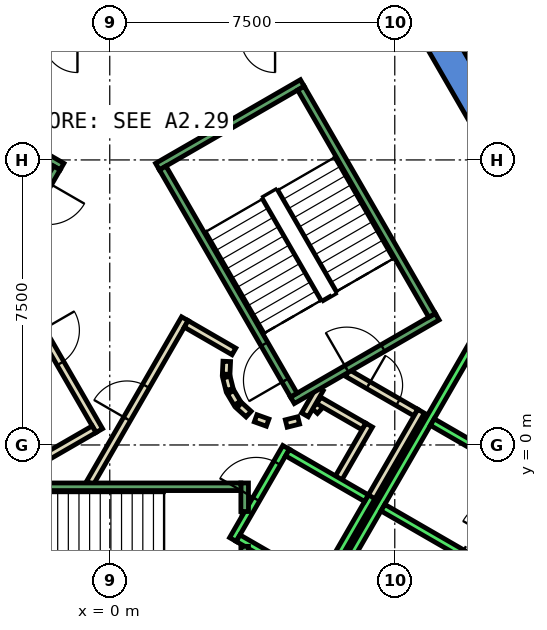
"""IFC4 building model, lengths in metres.
Left out: names, types, materials, properties, quantities, classifications, styles, units other than length and angle.
Written with IfcOpenShell. Run it as: python <this file> out.ifc"""

import sys

from ifc_helpers import new_model, si_unit, direction, frame, frame_2d, origin, place, context, subcontext, project, spatial, polyline, rectangle, outline, extrude, element, fill, save


model = new_model("IFC4")
c1 = context("Model", 3, precision=1e-05, world=origin(), true_north=direction((0.0, 1.0)))
c2 = subcontext(c1, "Body", "Model", "MODEL_VIEW")
j1 = project(units=[si_unit("LENGTHUNIT", "METRE"), si_unit("PLANEANGLEUNIT", "RADIAN")], contexts=[c1])
p1 = place(None, origin())
s1 = spatial("IfcSite", under=j1, at=p1, CompositionType="ELEMENT")
p2 = place(p1, origin())
s2 = spatial("IfcBuilding", under=s1, at=p2, CompositionType="ELEMENT")
p3 = place(p2, frame((0.0, 0.0, 142.4)))
s3 = spatial("IfcBuildingStorey", under=s2, at=p3, CompositionType="ELEMENT", Elevation=142.4)
p4 = place(p3, frame((0.0, 0.0, -0.4)))
e1 = element("IfcWall", 1, at=p4, inside=s3, PredefinedType="SHEAR", context=c2, shape_type="SweptSolid", body=[
    extrude(outline(polyline([(8.517, 11.748), (7.824, 11.348), (12.933, 2.5), (13.856, 2.5), (8.517, 11.748)])), origin(), (0.0, 0.0, 1.0), 4.2),
])
p5 = place(p3, frame((0.0, 0.0, -0.4)))
e2 = element("IfcWall", 2, at=p5, inside=s3, PredefinedType="SHEAR", context=c2, shape_type="SweptSolid", body=[
    extrude(outline(polyline([(10.717, -2.937), (10.025, -2.537), (9.374, -3.663), (10.067, -4.063), (10.717, -2.937)])), origin(), (0.0, 0.0, 1.0), 4.2),
])
p6 = place(p3, frame((5.39, 0.898, 0.0), z_axis=(0.0, 0.0, 1.0), x_axis=(0.673828488714, 0.738887791073, 0.0)))
e3 = element("IfcWall", 3, at=p6, inside=s3, PredefinedType="PARTITIONING", context=c2, shape_type="SweptSolid", body=[
    extrude(rectangle(XDim=0.263, YDim=0.2, at=frame_2d((0.131, 0.0))), origin(), (0.0, 0.0, 1.0), 3.8),
])
p7 = place(p3, frame((5.499, 1.172, 0.0), z_axis=(0.0, 0.0, 1.0), x_axis=(0.866333505267, -0.499465972466, 0.0)))
e4 = element("IfcWall", 4, at=p7, inside=s3, PredefinedType="PARTITIONING", context=c2, shape_type="SweptSolid", body=[
    extrude(rectangle(XDim=1.374, YDim=0.2, at=frame_2d((0.687, 0.0))), origin(), (0.0, 0.0, 1.0), 3.8),
])
p8 = place(p3, frame((6.826, 0.522, 0.0), z_axis=(0.0, 0.0, 1.0), x_axis=(-0.500016722714, -0.866015748706, 0.0)))
e5 = element("IfcWall", 5, at=p8, inside=s3, PredefinedType="PARTITIONING", context=c2, shape_type="SweptSolid", body=[
    extrude(rectangle(XDim=1.7, YDim=0.2, at=frame_2d((0.85, 0.0))), origin(), (0.0, 0.0, 1.0), 3.8),
])
p9 = place(p3, frame((6.25, 1.894, 0.0), z_axis=(0.0, 0.0, 1.0), x_axis=(0.866043184279, -0.499969202016, 0.0)))
e6 = element("IfcWall", 6, at=p9, inside=s3, PredefinedType="PARTITIONING", context=c2, shape_type="SweptSolid", body=[
    extrude(rectangle(XDim=2.084, YDim=0.2, at=frame_2d((1.042, 0.0))), origin(), (0.0, 0.0, 1.0), 3.8),
])
p10 = place(p9, frame((0.642, 0.0, 0.0)))
e7 = element("IfcOpeningElement", 7, at=p10, cuts=e6, PredefinedType="OPENING", context=c2, shape_type="SweptSolid", body=[
    extrude(rectangle(XDim=0.9, YDim=2.1, at=frame_2d((0.45, 1.05))), frame((0.0, 0.11, 0.0), z_axis=(0.0, -1.0, 0.0), x_axis=(1.0, 0.0, 0.0)), (0.0, 0.0, 1.0), 0.22),
])
p11 = place(p3, frame((8.192, 0.888, 0.0), z_axis=(0.0, 0.0, 1.0), x_axis=(-0.499940625693, -0.866059680843, 0.0)))
e8 = element("IfcWall", 8, at=p11, inside=s3, PredefinedType="PARTITIONING", context=c2, shape_type="SweptSolid", body=[
    extrude(rectangle(XDim=2.68, YDim=0.2, at=frame_2d((1.34, 0.0))), origin(), (0.0, 0.0, 1.0), 3.8),
])
p12 = place(p3, frame((5.135, 0.793, 0.0), z_axis=(0.0, 0.0, 1.0), x_axis=(0.499526442893, 0.866298639529, 0.0)))
e9 = element("IfcWall", 9, at=p12, inside=s3, PredefinedType="PARTITIONING", context=c2, shape_type="SweptSolid", body=[
    extrude(rectangle(XDim=0.791, YDim=0.2, at=frame_2d((0.396, 0.0))), origin(), (0.0, 0.0, 1.0), 3.8),
])
p13 = place(p3, frame((-0.52, -1.0, 0.0), z_axis=(0.0, 0.0, 1.0), x_axis=(0.50011622646, 0.865958290007, 0.0)))
e10 = element("IfcWall", 10, at=p13, inside=s3, PredefinedType="PARTITIONING", context=c2, shape_type="SweptSolid", body=[
    extrude(rectangle(XDim=4.991, YDim=0.2, at=frame_2d((2.496, 0.0))), origin(), (0.0, 0.0, 1.0), 3.8),
])
p14 = place(p13, frame((1.945, 0.0, 0.0)))
e11 = element("IfcOpeningElement", 11, at=p14, cuts=e10, PredefinedType="OPENING", context=c2, shape_type="SweptSolid", body=[
    extrude(rectangle(XDim=1.0, YDim=2.1, at=frame_2d((0.5, 1.05))), frame((0.0, 0.11, 0.0), z_axis=(0.0, -1.0, 0.0), x_axis=(1.0, 0.0, 0.0)), (0.0, 0.0, 1.0), 0.22),
])
p15 = place(p3, frame((2.012, 3.186, 0.0), z_axis=(0.0, 0.0, 1.0), x_axis=(0.865891012941, -0.500232699559, 0.0)))
e12 = element("IfcWall", 12, at=p15, inside=s3, PredefinedType="PARTITIONING", context=c2, shape_type="SweptSolid", body=[
    extrude(rectangle(XDim=1.449, YDim=0.2, at=frame_2d((0.725, 0.0))), origin(), (0.0, 0.0, 1.0), 3.8),
])
p16 = place(p3, frame((3.079, 2.199, 0.0), z_axis=(0.0, 0.0, 1.0), x_axis=(-0.047771483479, -0.998858290933, 0.0)))
e13 = element("IfcWall", 13, at=p16, inside=s3, PredefinedType="PARTITIONING", context=c2, shape_type="SweptSolid", body=[
    extrude(rectangle(XDim=0.337, YDim=0.2, at=frame_2d((0.169, 0.0))), origin(), (0.0, 0.0, 1.0), 3.8),
])
p17 = place(p3, frame((3.07, 1.786, 0.0), z_axis=(0.0, 0.0, 1.0), x_axis=(0.242705583207, -0.970099994784, 0.0)))
e14 = element("IfcWall", 14, at=p17, inside=s3, PredefinedType="PARTITIONING", context=c2, shape_type="SweptSolid", body=[
    extrude(rectangle(XDim=0.338, YDim=0.2, at=frame_2d((0.169, 0.0))), origin(), (0.0, 0.0, 1.0), 3.8),
])
for number, where, z_axis, x_axis in (
    (15, (3.182, 1.388, 0.0), (0.0, 0.0, 1.0), (0.512, -0.859, 0.0)),
    (16, (3.404, 1.039, 0.0), (0.0, 0.0, 1.0), (0.74, -0.672, 0.0)),
):
    element("IfcWall", number, at=place(p3, frame(where, z_axis=z_axis, x_axis=x_axis)), inside=s3, PredefinedType="PARTITIONING", context=c2, shape_type="SweptSolid", body=[
        extrude(rectangle(XDim=0.338, YDim=0.2, at=frame_2d((0.169, 0.0))), origin(), (0.0, 0.0, 1.0), 3.8),
    ])
p18 = place(p3, frame((3.838, 0.702, 0.0), z_axis=(0.0, 0.0, 1.0), x_axis=(0.941035081519, -0.338308993895, 0.0)))
e17 = element("IfcWall", 17, at=p18, inside=s3, PredefinedType="PARTITIONING", context=c2, shape_type="SweptSolid", body=[
    extrude(rectangle(XDim=0.337, YDim=0.2, at=frame_2d((0.168, 0.0))), origin(), (0.0, 0.0, 1.0), 3.8),
])
p19 = place(p3, frame((4.644, 0.564, 0.0), z_axis=(0.0, 0.0, 1.0), x_axis=(0.969929076366, 0.243387729394, 0.0)))
e18 = element("IfcWall", 18, at=p19, inside=s3, PredefinedType="PARTITIONING", context=c2, shape_type="SweptSolid", body=[
    extrude(rectangle(XDim=0.337, YDim=0.2, at=frame_2d((0.168, 0.0))), origin(), (0.0, 0.0, 1.0), 3.8),
])
p20 = place(p3, frame((-2.771, 4.7, 0.0), z_axis=(0.0, 0.0, 1.0), x_axis=(0.499969479948, -0.866043023828, 0.0)))
e19 = element("IfcWall", 19, at=p20, inside=s3, PredefinedType="PARTITIONING", context=c2, shape_type="SweptSolid", body=[
    extrude(rectangle(XDim=4.99, YDim=0.2, at=frame_2d((2.495, 0.0))), origin(), (0.0, 0.0, 1.0), 3.8),
])
p21 = place(p20, frame((1.945, 0.0, 0.0)))
e20 = element("IfcOpeningElement", 20, at=p21, cuts=e19, PredefinedType="OPENING", context=c2, shape_type="SweptSolid", body=[
    extrude(rectangle(XDim=1.0, YDim=2.1, at=frame_2d((0.5, 1.05))), frame((0.0, 0.11, 0.0), z_axis=(0.0, -1.0, 0.0), x_axis=(1.0, 0.0, 0.0)), (0.0, 0.0, 1.0), 0.22),
])
p22 = place(p3, frame((-0.412, 0.414, 0.0), z_axis=(0.0, 0.0, 1.0), x_axis=(-0.866017369001, -0.500013916395, 0.0)))
e21 = element("IfcWall", 21, at=p22, inside=s3, PredefinedType="PARTITIONING", context=c2, shape_type="SweptSolid", body=[
    extrude(rectangle(XDim=1.45, YDim=0.2, at=frame_2d((0.725, 0.0))), origin(), (0.0, 0.0, 1.0), 3.8),
])
p23 = place(p3, frame((3.24, -2.488, 0.0), z_axis=(0.0, 0.0, 1.0), x_axis=(0.49994636267, 0.866056369097, 0.0)))
e22 = element("IfcWall", 22, at=p23, inside=s3, PredefinedType="STANDARD", context=c2, shape_type="SweptSolid", body=[
    extrude(rectangle(XDim=2.8, YDim=0.2, at=frame_2d((1.4, 0.0))), origin(), (0.0, 0.0, 1.0), 3.8),
])
p24 = place(p23, frame((1.225, 0.0, 0.0)))
e23 = element("IfcOpeningElement", 23, at=p24, cuts=e22, PredefinedType="OPENING", context=c2, shape_type="SweptSolid", body=[
    extrude(rectangle(XDim=1.1, YDim=2.1, at=frame_2d((0.55, 1.05))), frame((0.0, 0.11, 0.0), z_axis=(0.0, -1.0, 0.0), x_axis=(1.0, 0.0, 0.0)), (0.0, 0.0, 1.0), 0.22),
])
p25 = place(p3, frame((5.492, -3.788, 0.0), z_axis=(0.0, 0.0, 1.0), x_axis=(0.500011755427, 0.866018616679, 0.0)))
e24 = element("IfcWall", 24, at=p25, inside=s3, PredefinedType="STANDARD", context=c2, shape_type="SweptSolid", body=[
    extrude(rectangle(XDim=2.8, YDim=0.2, at=frame_2d((1.4, 0.0))), origin(), (0.0, 0.0, 1.0), 3.8),
])
p26 = place(p3, frame((3.377, -2.452, 0.0), z_axis=(0.0, 0.0, 1.0), x_axis=(0.865955154139, -0.50012165622, 0.0)))
e25 = element("IfcWall", 25, at=p26, inside=s3, PredefinedType="STANDARD", context=c2, shape_type="SweptSolid", body=[
    extrude(rectangle(XDim=2.4, YDim=0.2, at=frame_2d((1.2, 0.0))), origin(), (0.0, 0.0, 1.0), 3.8),
])
p27 = place(p3, frame((4.677, -0.2, 0.0), z_axis=(0.0, 0.0, 1.0), x_axis=(0.865973769406, -0.500089422704, 0.0)))
e26 = element("IfcWall", 26, at=p27, inside=s3, PredefinedType="STANDARD", context=c2, shape_type="SweptSolid", body=[
    extrude(rectangle(XDim=2.399, YDim=0.2, at=frame_2d((1.2, 0.0))), origin(), (0.0, 0.0, 1.0), 3.8),
])
p28 = place(p3, frame((4.451, -6.19, 0.0), z_axis=(0.0, 0.0, 1.0), x_axis=(0.50000090737, 0.866024879913, 0.0)))
e27 = element("IfcWall", 27, at=p28, inside=s3, PredefinedType="STANDARD", context=c2, shape_type="SweptSolid", body=[
    extrude(rectangle(XDim=10.6, YDim=0.2, at=frame_2d((5.3, 0.0))), origin(), (0.0, 0.0, 1.0), 3.8),
])
for number, where, z_axis, x_axis in (
    (28, (7.188, -1.65, 0.0), (0.0, 0.0, 1.0), (0.866, -0.5, 0.0)),
    (29, (8.488, 0.602, 0.0), (0.0, 0.0, 1.0), (0.866, -0.5, 0.0)),
):
    element("IfcWall", number, at=place(p3, frame(where, z_axis=z_axis, x_axis=x_axis)), inside=s3, PredefinedType="STANDARD", context=c2, shape_type="SweptSolid", body=[
        extrude(rectangle(XDim=2.5, YDim=0.2, at=frame_2d((1.25, 0.0))), origin(), (0.0, 0.0, 1.0), 3.8),
    ])
p29 = place(p3, frame((3.55, -2.667, 0.0), z_axis=(0.0, 0.0, 1.0), x_axis=(0.0, -1.0, 0.0)))
e30 = element("IfcWall", 30, at=p29, inside=s3, PredefinedType="STANDARD", context=c2, shape_type="SweptSolid", body=[
    extrude(rectangle(XDim=2.733, YDim=0.2, at=frame_2d((1.366, 0.0))), origin(), (0.0, 0.0, 1.0), 3.8),
])
p30 = place(p3, frame((3.55, -1.0, 0.0), z_axis=(0.0, 0.0, 1.0), x_axis=(0.0, -1.0, 0.0)))
e31 = element("IfcWall", 31, at=p30, inside=s3, PredefinedType="STANDARD", context=c2, shape_type="SweptSolid", body=[
    extrude(rectangle(XDim=0.751, YDim=0.2, at=frame_2d((0.375, 0.0))), origin(), (0.0, 0.0, 1.0), 3.8),
])
p31 = place(p3, frame((-3.45, -1.1, 0.0), z_axis=(0.0, 0.0, 1.0), x_axis=(1.0, 0.0, 0.0)))
e32 = element("IfcWall", 32, at=p31, inside=s3, PredefinedType="STANDARD", context=c2, shape_type="SweptSolid", body=[
    extrude(rectangle(XDim=6.9, YDim=0.2, at=frame_2d((3.45, 0.0))), origin(), (0.0, 0.0, 1.0), 3.8),
])
p32 = place(p31, frame((0.45, 0.0, 0.0)))
e33 = element("IfcOpeningElement", 33, at=p32, cuts=e32, PredefinedType="OPENING", context=c2, shape_type="SweptSolid", body=[
    extrude(rectangle(XDim=1.1, YDim=2.2, at=frame_2d((0.55, 1.1))), frame((0.0, 0.11, 0.0), z_axis=(0.0, -1.0, 0.0), x_axis=(1.0, 0.0, 0.0)), (0.0, 0.0, 1.0), 0.22),
])
p33 = place(p3, frame((4.806, 1.176, 0.0), z_axis=(0.0, 0.0, 1.0), x_axis=(0.866059941101, 0.499940174841, 0.0)))
e34 = element("IfcWall", 34, at=p33, inside=s3, PredefinedType="STANDARD", context=c2, shape_type="SweptSolid", body=[
    extrude(rectangle(XDim=4.4, YDim=0.2, at=frame_2d((2.2, 0.0))), origin(), (0.0, 0.0, 1.0), 3.8),
])
p34 = place(p33, frame((1.65, 0.0, 0.0)))
e35 = element("IfcOpeningElement", 35, at=p34, cuts=e34, PredefinedType="OPENING", context=c2, shape_type="SweptSolid", body=[
    extrude(rectangle(XDim=1.1, YDim=2.2, at=frame_2d((0.55, 1.1))), frame((0.0, 0.11, 0.0), z_axis=(0.0, -1.0, 0.0), x_axis=(1.0, 0.0, 0.0)), (0.0, 0.0, 1.0), 0.22),
])
p35 = place(p3, frame((1.256, 7.324, 0.0), z_axis=(0.0, 0.0, 1.0), x_axis=(0.866046073146, 0.499964197906, 0.0)))
e36 = element("IfcWall", 36, at=p35, inside=s3, PredefinedType="STANDARD", context=c2, shape_type="SweptSolid", body=[
    extrude(rectangle(XDim=4.4, YDim=0.2, at=frame_2d((2.2, 0.0))), origin(), (0.0, 0.0, 1.0), 3.8),
])
p36 = place(p3, frame((4.843, 1.312, 0.0), z_axis=(0.0, 0.0, 1.0), x_axis=(-0.499963383562, 0.866046543262, 0.0)))
e37 = element("IfcWall", 37, at=p36, inside=s3, PredefinedType="STANDARD", context=c2, shape_type="SweptSolid", body=[
    extrude(rectangle(XDim=6.9, YDim=0.2, at=frame_2d((3.45, 0.0))), origin(), (0.0, 0.0, 1.0), 3.8),
])
p37 = place(p36, frame((0.45, 0.0, 0.0)))
e38 = element("IfcOpeningElement", 38, at=p37, cuts=e37, PredefinedType="OPENING", context=c2, shape_type="SweptSolid", body=[
    extrude(rectangle(XDim=1.1, YDim=2.2, at=frame_2d((0.55, 1.1))), frame((0.0, 0.11, 0.0), z_axis=(0.0, -1.0, 0.0), x_axis=(1.0, 0.0, 0.0)), (0.0, 0.0, 1.0), 0.22),
])
p38 = place(p3, frame((8.48, 3.412, 0.0), z_axis=(0.0, 0.0, 1.0), x_axis=(-0.499978703459, 0.866037698999, 0.0)))
e39 = element("IfcWall", 39, at=p38, inside=s3, PredefinedType="STANDARD", context=c2, shape_type="SweptSolid", body=[
    extrude(rectangle(XDim=6.9, YDim=0.2, at=frame_2d((3.45, 0.0))), origin(), (0.0, 0.0, 1.0), 3.8),
])
p39 = place(p3, frame((-1.256, 7.324, 0.0), z_axis=(0.0, 0.0, 1.0), x_axis=(-0.866046073146, 0.499964197906, 0.0)))
e40 = element("IfcWall", 40, at=p39, inside=s3, PredefinedType="STANDARD", context=c2, shape_type="SweptSolid", body=[
    extrude(rectangle(XDim=4.4, YDim=0.2, at=frame_2d((2.2, 0.0))), origin(), (0.0, 0.0, 1.0), 3.8),
])
p40 = place(p39, frame((1.65, 0.0, 0.0)))
e41 = element("IfcOpeningElement", 41, at=p40, cuts=e40, PredefinedType="OPENING", context=c2, shape_type="SweptSolid", body=[
    extrude(rectangle(XDim=1.1, YDim=2.2, at=frame_2d((0.55, 1.1))), frame((0.0, 0.11, 0.0), z_axis=(0.0, -1.0, 0.0), x_axis=(1.0, 0.0, 0.0)), (0.0, 0.0, 1.0), 0.22),
])
p41 = place(p3, frame((-1.393, 7.288, 0.0), z_axis=(0.0, 0.0, 1.0), x_axis=(-0.499963383562, -0.866046543262, 0.0)))
e42 = element("IfcWall", 42, at=p41, inside=s3, PredefinedType="STANDARD", context=c2, shape_type="SweptSolid", body=[
    extrude(rectangle(XDim=6.9, YDim=0.2, at=frame_2d((3.45, 0.0))), origin(), (0.0, 0.0, 1.0), 3.8),
])
p42 = place(p41, frame((0.45, 0.0, 0.0)))
e43 = element("IfcOpeningElement", 43, at=p42, cuts=e42, PredefinedType="OPENING", context=c2, shape_type="SweptSolid", body=[
    extrude(rectangle(XDim=1.1, YDim=2.2, at=frame_2d((0.55, 1.1))), frame((0.0, 0.11, 0.0), z_axis=(0.0, -1.0, 0.0), x_axis=(1.0, 0.0, 0.0)), (0.0, 0.0, 1.0), 0.22),
])
p43 = place(p14, origin())
e44 = element("IfcDoor", 44, at=p43, inside=s3, OperationType="SINGLE_SWING_LEFT", PredefinedType="DOOR", context=c2, shape_type="SweptSolid", body=[
    extrude(rectangle(XDim=1.0, YDim=2.1, at=frame_2d((0.5, 1.05))), frame((0.0, 0.025, 0.0), z_axis=(0.0, -1.0, 0.0), x_axis=(1.0, 0.0, 0.0)), (0.0, 0.0, 1.0), 0.05),
])
fill(e11, e44)
p44 = place(p21, origin())
e45 = element("IfcDoor", 45, at=p44, inside=s3, OperationType="SINGLE_SWING_RIGHT", PredefinedType="DOOR", context=c2, shape_type="SweptSolid", body=[
    extrude(rectangle(XDim=1.0, YDim=2.1, at=frame_2d((0.5, 1.05))), frame((0.0, 0.025, 0.0), z_axis=(0.0, -1.0, 0.0), x_axis=(1.0, 0.0, 0.0)), (0.0, 0.0, 1.0), 0.05),
])
fill(e20, e45)
p45 = place(p10, origin())
e46 = element("IfcDoor", 46, at=p45, inside=s3, OperationType="SINGLE_SWING_LEFT", PredefinedType="DOOR", context=c2, shape_type="SweptSolid", body=[
    extrude(rectangle(XDim=0.9, YDim=2.1, at=frame_2d((0.45, 1.05))), frame((0.0, 0.025, 0.0), z_axis=(0.0, -1.0, 0.0), x_axis=(1.0, 0.0, 0.0)), (0.0, 0.0, 1.0), 0.05),
])
fill(e7, e46)
p46 = place(p24, origin())
e47 = element("IfcDoor", 47, at=p46, inside=s3, OperationType="SLIDING_TO_LEFT", PredefinedType="DOOR", context=c2, shape_type="SweptSolid", body=[
    extrude(rectangle(XDim=1.1, YDim=2.1, at=frame_2d((0.55, 1.05))), frame((0.0, 0.025, 0.0), z_axis=(0.0, -1.0, 0.0), x_axis=(1.0, 0.0, 0.0)), (0.0, 0.0, 1.0), 0.05),
])
fill(e23, e47)
p47 = place(p37, origin())
e48 = element("IfcDoor", 48, at=p47, inside=s3, OperationType="SINGLE_SWING_LEFT", PredefinedType="DOOR", context=c2, shape_type="SweptSolid", body=[
    extrude(rectangle(XDim=1.1, YDim=2.2, at=frame_2d((0.55, 1.1))), frame((0.0, 0.025, 0.0), z_axis=(0.0, -1.0, 0.0), x_axis=(1.0, 0.0, 0.0)), (0.0, 0.0, 1.0), 0.05),
])
fill(e38, e48)
p48 = place(p34, origin())
e49 = element("IfcDoor", 49, at=p48, inside=s3, OperationType="SINGLE_SWING_LEFT", PredefinedType="DOOR", context=c2, shape_type="SweptSolid", body=[
    extrude(rectangle(XDim=1.1, YDim=2.2, at=frame_2d((0.55, 1.1))), frame((0.0, 0.025, 0.0), z_axis=(0.0, -1.0, 0.0), x_axis=(1.0, 0.0, 0.0)), (0.0, 0.0, 1.0), 0.05),
])
fill(e35, e49)
save(model, sys.argv[1])
